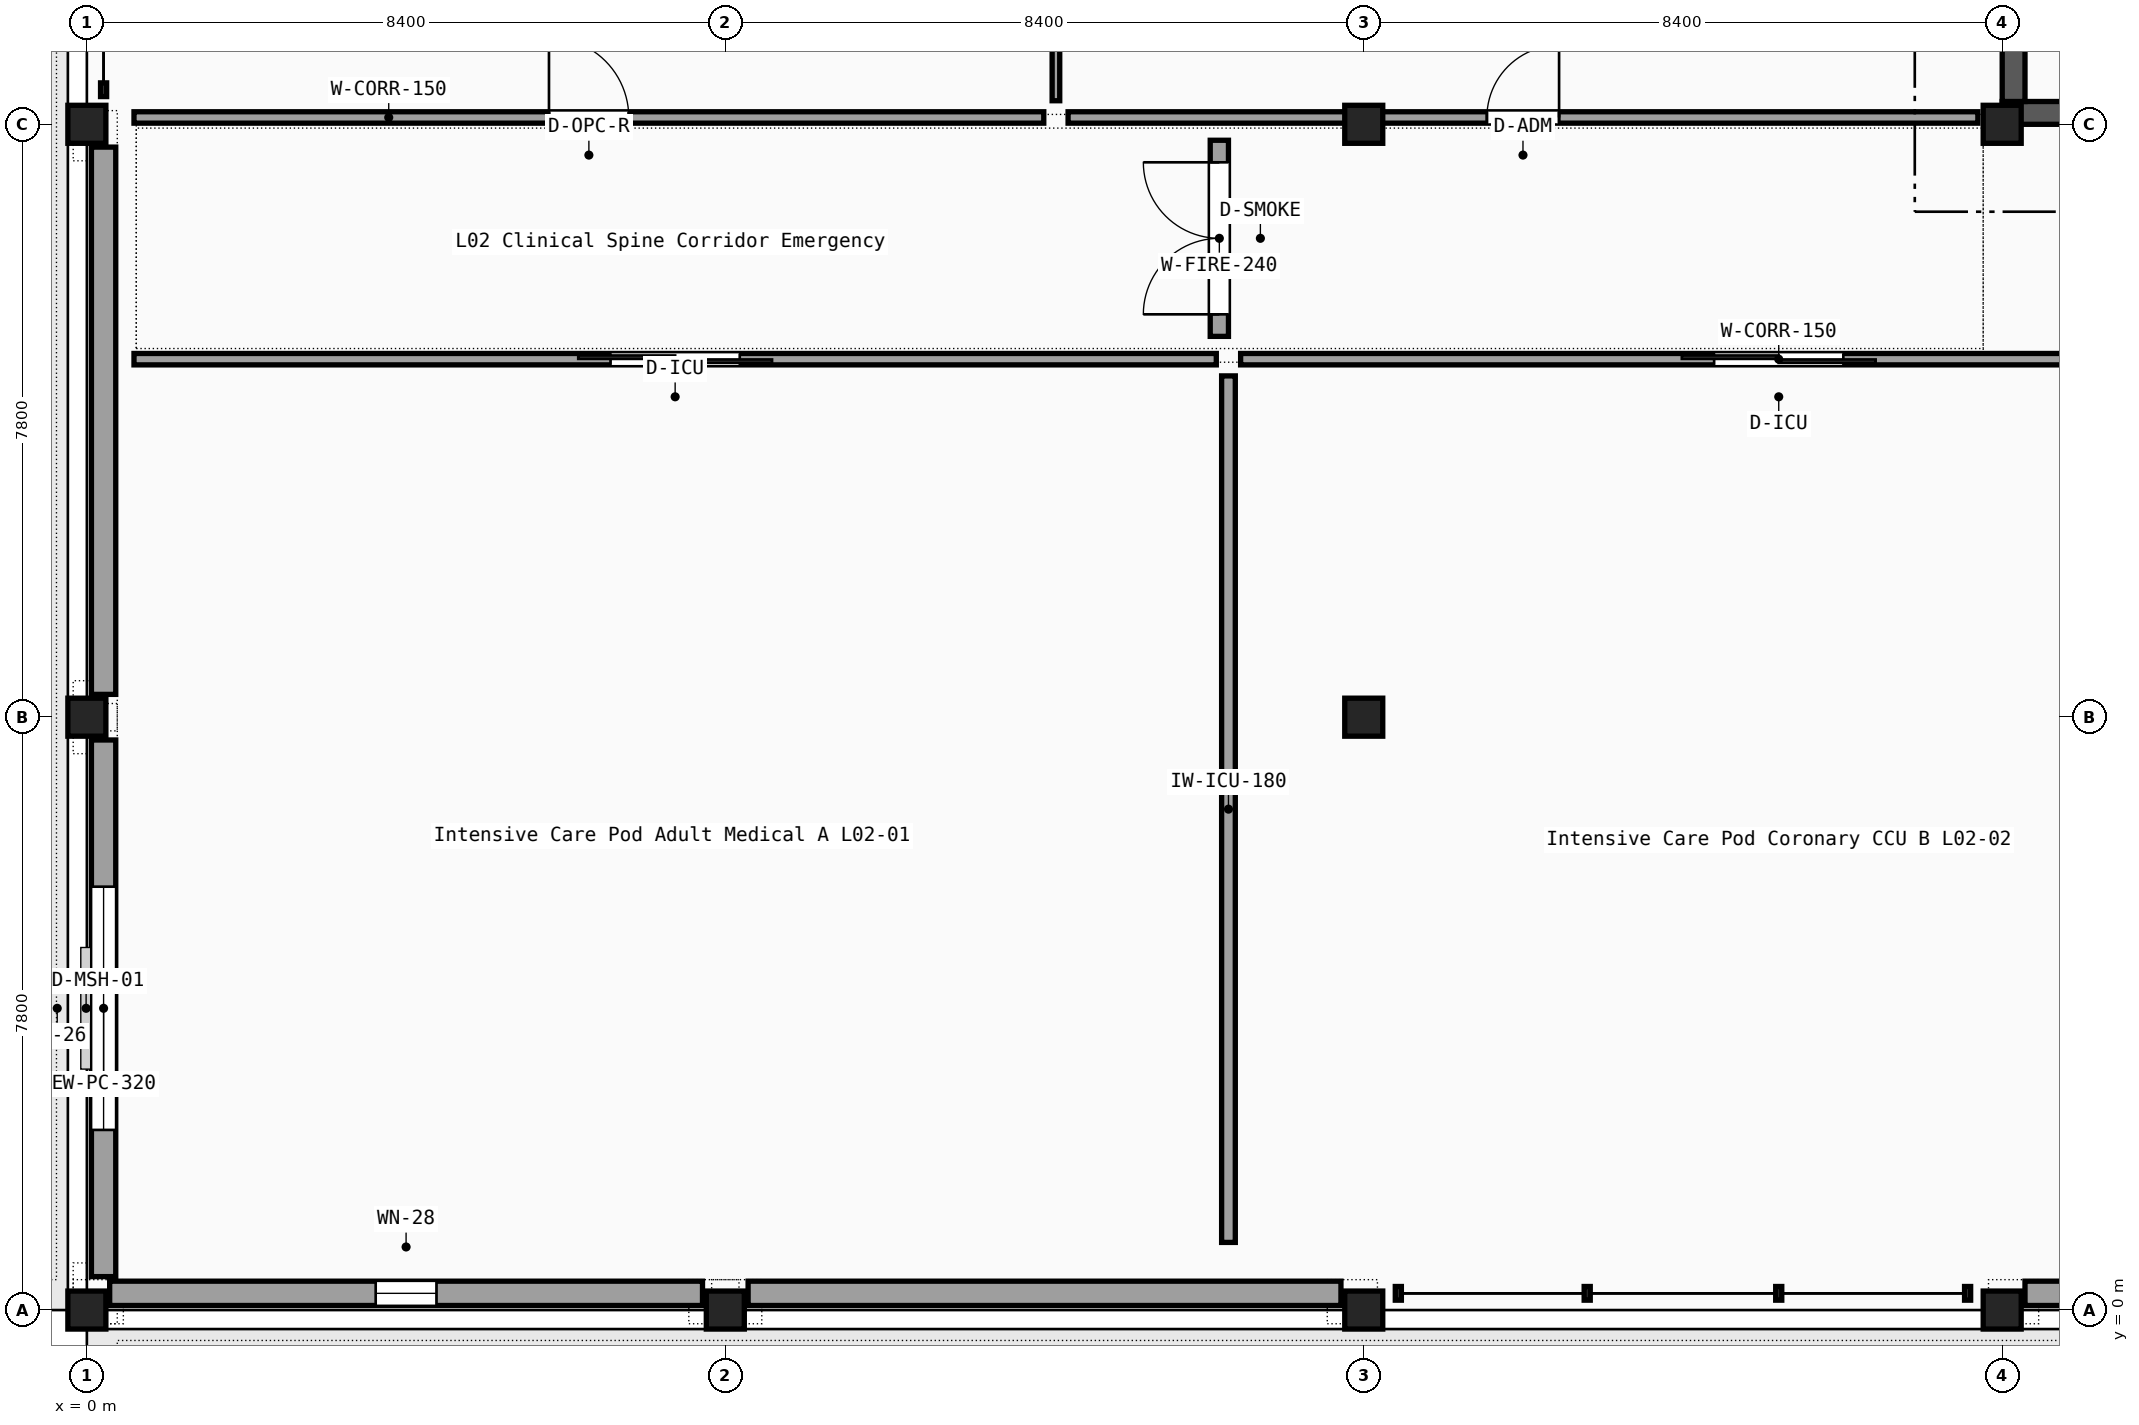
"""IFC4 building model, lengths in metres.
Left out: names, types, materials, properties, quantities, classifications, styles, units other than length and angle.
Written with IfcOpenShell. Run it as: python <this file> out.ifc"""

import sys

from ifc_helpers import new_model, si_unit, direction, frame, frame_2d, origin, origin_2d, place, context, subcontext, project, spatial, rectangle, extrude, element, fill, save


model = new_model("IFC4")
c1 = context("Model", 3, precision=1e-05, world=origin(), true_north=direction((0.0, 1.0)))
c2 = subcontext(c1, "Body", "Model", "MODEL_VIEW")
j1 = project(units=[si_unit("LENGTHUNIT", "METRE"), si_unit("PLANEANGLEUNIT", "RADIAN")], contexts=[c1])
p1 = place(None, origin())
s1 = spatial("IfcSite", under=j1, at=p1, CompositionType="ELEMENT")
p2 = place(p1, origin())
s2 = spatial("IfcBuilding", under=s1, at=p2, CompositionType="ELEMENT")
p3 = place(p2, frame((0.0, 0.0, 10.2)))
s3 = spatial("IfcBuildingStorey", under=s2, at=p3, CompositionType="ELEMENT", Elevation=10.2)
for number, where, z_axis, x_axis in (
    (1, (0.0, 0.0, 0.0), (0.0, 0.0, 1.0), (1.0, 0.0, 0.0)),
    (2, (0.0, 7.8, 0.0), (0.0, 0.0, 1.0), (1.0, 0.0, 0.0)),
    (3, (0.0, 15.6, 0.0), (0.0, 0.0, 1.0), (1.0, 0.0, 0.0)),
    (4, (8.4, 0.0, 0.0), (0.0, 0.0, 1.0), (1.0, 0.0, 0.0)),
    (5, (16.8, 0.0, 0.0), (0.0, 0.0, 1.0), (1.0, 0.0, 0.0)),
    (6, (16.8, 7.8, 0.0), (0.0, 0.0, 1.0), (1.0, 0.0, 0.0)),
    (7, (16.8, 15.6, 0.0), (0.0, 0.0, 1.0), (1.0, 0.0, 0.0)),
    (8, (25.2, 0.0, 0.0), (0.0, 0.0, 1.0), (1.0, 0.0, 0.0)),
    (9, (25.2, 15.6, 0.0), (0.0, 0.0, 1.0), (1.0, 0.0, 0.0)),
):
    element("IfcColumn", number, at=place(p3, frame(where, z_axis=z_axis, x_axis=x_axis)), inside=s3, PredefinedType="COLUMN", context=c2, shape_type="SweptSolid", body=[
        extrude(rectangle(XDim=0.5, YDim=0.5, at=origin_2d()), origin(), (0.0, 0.0, 1.0), 4.65),
    ])
p4 = place(p3, frame((0.22, 0.44, 0.0), z_axis=(0.0, 0.0, 1.0), x_axis=(0.0, 1.0, 0.0)))
e10 = element("IfcWall", 10, at=p4, inside=s3, PredefinedType="SOLIDWALL", context=c2, shape_type="SweptSolid", body=[
    extrude(rectangle(XDim=7.06, YDim=0.32, at=frame_2d((3.53, 0.0))), origin(), (0.0, 0.0, 1.0), 4.04),
])
p5 = place(p4, frame((1.93, 0.0, 0.75)))
e11 = element("IfcOpeningElement", 11, at=p5, cuts=e10, PredefinedType="OPENING", context=c2, shape_type="SweptSolid", body=[
    extrude(rectangle(XDim=3.2, YDim=1.8, at=frame_2d((1.6, 0.9))), frame((0.0, 0.17, 0.0), z_axis=(0.0, -1.0, 0.0), x_axis=(1.0, 0.0, 0.0)), (0.0, 0.0, 1.0), 0.34),
])
p6 = place(p3, frame((0.22, 8.1, 0.0), z_axis=(0.0, 0.0, 1.0), x_axis=(0.0, 1.0, 0.0)))
e12 = element("IfcWall", 12, at=p6, inside=s3, PredefinedType="SOLIDWALL", context=c2, shape_type="SweptSolid", body=[
    extrude(rectangle(XDim=7.2, YDim=0.32, at=frame_2d((3.6, 0.0))), origin(), (0.0, 0.0, 1.0), 4.04),
])
p7 = place(p3, frame((0.3, 0.22, 0.0), z_axis=(0.0, 0.0, 1.0), x_axis=(1.0, 0.0, 0.0)))
e13 = element("IfcWall", 13, at=p7, inside=s3, PredefinedType="SOLIDWALL", context=c2, shape_type="SweptSolid", body=[
    extrude(rectangle(XDim=7.8, YDim=0.32, at=frame_2d((3.9, 0.0))), origin(), (0.0, 0.0, 1.0), 4.04),
])
p8 = place(p7, frame((3.5, 0.0, 0.95)))
e14 = element("IfcOpeningElement", 14, at=p8, cuts=e13, PredefinedType="OPENING", context=c2, shape_type="SweptSolid", body=[
    extrude(rectangle(XDim=0.8, YDim=1.65, at=frame_2d((0.4, 0.825))), frame((0.0, 0.17, 0.0), z_axis=(0.0, -1.0, 0.0), x_axis=(1.0, 0.0, 0.0)), (0.0, 0.0, 1.0), 0.34),
])
for number, where, z_axis, x_axis in (
    (15, (8.7, 0.22, 0.0), (0.0, 0.0, 1.0), (1.0, 0.0, 0.0)),
    (16, (25.5, 0.22, 0.0), (0.0, 0.0, 1.0), (1.0, 0.0, 0.0)),
):
    element("IfcWall", number, at=place(p3, frame(where, z_axis=z_axis, x_axis=x_axis)), inside=s3, PredefinedType="SOLIDWALL", context=c2, shape_type="SweptSolid", body=[
        extrude(rectangle(XDim=7.8, YDim=0.32, at=frame_2d((3.9, 0.0))), origin(), (0.0, 0.0, 1.0), 4.04),
    ])
p9 = place(p3, frame((25.2, 15.75, 0.0), z_axis=(0.0, 0.0, 1.0), x_axis=(1.0, 0.0, 0.0)))
e17 = element("IfcWall", 17, at=p9, inside=s3, PredefinedType="SHEAR", context=c2, shape_type="SweptSolid", body=[
    extrude(rectangle(XDim=8.4, YDim=0.3, at=frame_2d((4.2, 0.0))), origin(), (0.0, 0.0, 1.0), 4.4),
])
p10 = place(p9, frame((1.38, 0.0, 0.0)))
e18 = element("IfcOpeningElement", 18, at=p10, cuts=e17, PredefinedType="OPENING", context=c2, shape_type="SweptSolid", body=[
    extrude(rectangle(XDim=1.2, YDim=2.15, at=frame_2d((0.6, 1.075))), frame((0.0, 0.16, 0.0), z_axis=(0.0, -1.0, 0.0), x_axis=(1.0, 0.0, 0.0)), (0.0, 0.0, 1.0), 0.32),
])
p11 = place(p9, frame((4.43, 0.0, 0.0)))
e19 = element("IfcOpeningElement", 19, at=p11, cuts=e17, PredefinedType="OPENING", context=c2, shape_type="SweptSolid", body=[
    extrude(rectangle(XDim=1.1, YDim=2.15, at=frame_2d((0.55, 1.075))), frame((0.0, 0.16, 0.0), z_axis=(0.0, -1.0, 0.0), x_axis=(1.0, 0.0, 0.0)), (0.0, 0.0, 1.0), 0.32),
])
p12 = place(p3, frame((25.35, 15.9, 0.0), z_axis=(0.0, 0.0, 1.0), x_axis=(0.0, 1.0, 0.0)))
e20 = element("IfcWall", 20, at=p12, inside=s3, PredefinedType="SHEAR", context=c2, shape_type="SweptSolid", body=[
    extrude(rectangle(XDim=7.2, YDim=0.3, at=frame_2d((3.6, 0.0))), origin(), (0.0, 0.0, 1.0), 4.4),
])
p13 = place(p3, frame((0.62, 12.51, 0.0), z_axis=(0.0, 0.0, 1.0), x_axis=(1.0, 0.0, 0.0)))
e21 = element("IfcWall", 21, at=p13, inside=s3, PredefinedType="PARTITIONING", context=c2, shape_type="SweptSolid", body=[
    extrude(rectangle(XDim=14.24, YDim=0.15, at=frame_2d((7.12, 0.0))), origin(), (0.0, 0.0, 1.0), 4.37),
])
p14 = place(p13, frame((6.27, 0.0, 0.0)))
e22 = element("IfcOpeningElement", 22, at=p14, cuts=e21, PredefinedType="OPENING", context=c2, shape_type="SweptSolid", body=[
    extrude(rectangle(XDim=1.7, YDim=2.3, at=frame_2d((0.85, 1.15))), frame((0.0, 0.085, 0.0), z_axis=(0.0, -1.0, 0.0), x_axis=(1.0, 0.0, 0.0)), (0.0, 0.0, 1.0), 0.17),
])
p15 = place(p3, frame((15.02, 0.89, 0.0), z_axis=(0.0, 0.0, 1.0), x_axis=(0.0, 1.0, 0.0)))
e23 = element("IfcWall", 23, at=p15, inside=s3, PredefinedType="PARTITIONING", context=c2, shape_type="SweptSolid", body=[
    extrude(rectangle(XDim=11.4, YDim=0.18, at=frame_2d((5.7, 0.0))), origin(), (0.0, 0.0, 1.0), 4.37),
])
p16 = place(p3, frame((15.18, 12.51, 0.0), z_axis=(0.0, 0.0, 1.0), x_axis=(1.0, 0.0, 0.0)))
e24 = element("IfcWall", 24, at=p16, inside=s3, PredefinedType="PARTITIONING", context=c2, shape_type="SweptSolid", body=[
    extrude(rectangle(XDim=14.16, YDim=0.15, at=frame_2d((7.08, 0.0))), origin(), (0.0, 0.0, 1.0), 4.04),
])
p17 = place(p16, frame((6.23, 0.0, 0.0)))
e25 = element("IfcOpeningElement", 25, at=p17, cuts=e24, PredefinedType="OPENING", context=c2, shape_type="SweptSolid", body=[
    extrude(rectangle(XDim=1.7, YDim=2.3, at=frame_2d((0.85, 1.15))), frame((0.0, 0.085, 0.0), z_axis=(0.0, -1.0, 0.0), x_axis=(1.0, 0.0, 0.0)), (0.0, 0.0, 1.0), 0.17),
])
p18 = place(p3, frame((0.62, 15.69, 0.0), z_axis=(0.0, 0.0, 1.0), x_axis=(1.0, 0.0, 0.0)))
e26 = element("IfcWall", 26, at=p18, inside=s3, PredefinedType="PARTITIONING", context=c2, shape_type="SweptSolid", body=[
    extrude(rectangle(XDim=11.97, YDim=0.15, at=frame_2d((5.985, 0.0))), origin(), (0.0, 0.0, 1.0), 4.04),
])
p19 = place(p18, frame((5.46, 0.0, 0.0)))
e27 = element("IfcOpeningElement", 27, at=p19, cuts=e26, PredefinedType="OPENING", context=c2, shape_type="SweptSolid", body=[
    extrude(rectangle(XDim=1.05, YDim=2.15, at=frame_2d((0.525, 1.075))), frame((0.0, 0.085, 0.0), z_axis=(0.0, -1.0, 0.0), x_axis=(1.0, 0.0, 0.0)), (0.0, 0.0, 1.0), 0.17),
])
p20 = place(p3, frame((12.75, 15.91, 0.0), z_axis=(0.0, 0.0, 1.0), x_axis=(0.0, 1.0, 0.0)))
e28 = element("IfcWall", 28, at=p20, inside=s3, PredefinedType="PARTITIONING", context=c2, shape_type="SweptSolid", body=[
    extrude(rectangle(XDim=22.4, YDim=0.1, at=frame_2d((11.2, 0.0))), origin(), (0.0, 0.0, 1.0), 4.04),
])
p21 = place(p3, frame((12.91, 15.69, 0.0), z_axis=(0.0, 0.0, 1.0), x_axis=(1.0, 0.0, 0.0)))
e29 = element("IfcWall", 29, at=p21, inside=s3, PredefinedType="PARTITIONING", context=c2, shape_type="SweptSolid", body=[
    extrude(rectangle(XDim=11.97, YDim=0.15, at=frame_2d((5.985, 0.0))), origin(), (0.0, 0.0, 1.0), 4.04),
])
p22 = place(p21, frame((5.51, 0.0, 0.0)))
e30 = element("IfcOpeningElement", 30, at=p22, cuts=e29, PredefinedType="OPENING", context=c2, shape_type="SweptSolid", body=[
    extrude(rectangle(XDim=0.95, YDim=2.1, at=frame_2d((0.475, 1.05))), frame((0.0, 0.085, 0.0), z_axis=(0.0, -1.0, 0.0), x_axis=(1.0, 0.0, 0.0)), (0.0, 0.0, 1.0), 0.17),
])
p23 = place(p3, frame((14.9, 12.81, 0.0), z_axis=(0.0, 0.0, 1.0), x_axis=(0.0, 1.0, 0.0)))
e31 = element("IfcWall", 31, at=p23, inside=s3, PredefinedType="PARTITIONING", context=c2, shape_type="SweptSolid", body=[
    extrude(rectangle(XDim=2.58, YDim=0.24, at=frame_2d((1.29, 0.0))), origin(), (0.0, 0.0, 1.0), 4.04),
])
p24 = place(p23, frame((0.29, 0.0, 0.0)))
e32 = element("IfcOpeningElement", 32, at=p24, cuts=e31, PredefinedType="OPENING", context=c2, shape_type="SweptSolid", body=[
    extrude(rectangle(XDim=2.0, YDim=2.3, at=frame_2d((1.0, 1.15))), frame((0.0, 0.13, 0.0), z_axis=(0.0, -1.0, 0.0), x_axis=(1.0, 0.0, 0.0)), (0.0, 0.0, 1.0), 0.26),
])
p25 = place(p5, origin())
e33 = element("IfcWindow", 33, at=p25, inside=s3, PartitioningType="SINGLE_PANEL", PredefinedType="WINDOW", context=c2, shape_type="SweptSolid", body=[
    extrude(rectangle(XDim=3.2, YDim=1.8, at=frame_2d((1.6, 0.9))), frame((0.0, 0.03, 0.0), z_axis=(0.0, -1.0, 0.0), x_axis=(1.0, 0.0, 0.0)), (0.0, 0.0, 1.0), 0.06),
])
fill(e11, e33)
p26 = place(p8, origin())
e34 = element("IfcWindow", 34, at=p26, inside=s3, PartitioningType="SINGLE_PANEL", PredefinedType="WINDOW", context=c2, shape_type="SweptSolid", body=[
    extrude(rectangle(XDim=0.8, YDim=1.65, at=frame_2d((0.4, 0.825))), frame((0.0, 0.03, 0.0), z_axis=(0.0, -1.0, 0.0), x_axis=(1.0, 0.0, 0.0)), (0.0, 0.0, 1.0), 0.06),
])
fill(e14, e34)
p27 = place(p14, origin())
e35 = element("IfcDoor", 35, at=p27, inside=s3, OperationType="DOUBLE_DOOR_SLIDING", PredefinedType="DOOR", context=c2, shape_type="SweptSolid", body=[
    extrude(rectangle(XDim=1.7, YDim=2.3, at=frame_2d((0.85, 1.15))), frame((0.0, 0.025, 0.0), z_axis=(0.0, -1.0, 0.0), x_axis=(1.0, 0.0, 0.0)), (0.0, 0.0, 1.0), 0.05),
])
fill(e22, e35)
p28 = place(p17, origin())
e36 = element("IfcDoor", 36, at=p28, inside=s3, OperationType="DOUBLE_DOOR_SLIDING", PredefinedType="DOOR", context=c2, shape_type="SweptSolid", body=[
    extrude(rectangle(XDim=1.7, YDim=2.3, at=frame_2d((0.85, 1.15))), frame((0.0, 0.025, 0.0), z_axis=(0.0, -1.0, 0.0), x_axis=(1.0, 0.0, 0.0)), (0.0, 0.0, 1.0), 0.05),
])
fill(e25, e36)
p29 = place(p19, origin())
e37 = element("IfcDoor", 37, at=p29, inside=s3, OperationType="SINGLE_SWING_LEFT", PredefinedType="DOOR", context=c2, shape_type="SweptSolid", body=[
    extrude(rectangle(XDim=1.05, YDim=2.15, at=frame_2d((0.525, 1.075))), frame((0.0, 0.025, 0.0), z_axis=(0.0, -1.0, 0.0), x_axis=(1.0, 0.0, 0.0)), (0.0, 0.0, 1.0), 0.05),
])
fill(e27, e37)
p30 = place(p22, origin())
e38 = element("IfcDoor", 38, at=p30, inside=s3, OperationType="SINGLE_SWING_RIGHT", PredefinedType="DOOR", context=c2, shape_type="SweptSolid", body=[
    extrude(rectangle(XDim=0.95, YDim=2.1, at=frame_2d((0.475, 1.05))), frame((0.0, 0.025, 0.0), z_axis=(0.0, -1.0, 0.0), x_axis=(1.0, 0.0, 0.0)), (0.0, 0.0, 1.0), 0.05),
])
fill(e30, e38)
p31 = place(p24, origin())
e39 = element("IfcDoor", 39, at=p31, inside=s3, OperationType="DOUBLE_SWING_LEFT", PredefinedType="DOOR", context=c2, shape_type="SweptSolid", body=[
    extrude(rectangle(XDim=2.0, YDim=2.3, at=frame_2d((1.0, 1.15))), frame((0.0, 0.025, 0.0), z_axis=(0.0, -1.0, 0.0), x_axis=(1.0, 0.0, 0.0)), (0.0, 0.0, 1.0), 0.05),
])
fill(e32, e39)
save(model, sys.argv[1])
